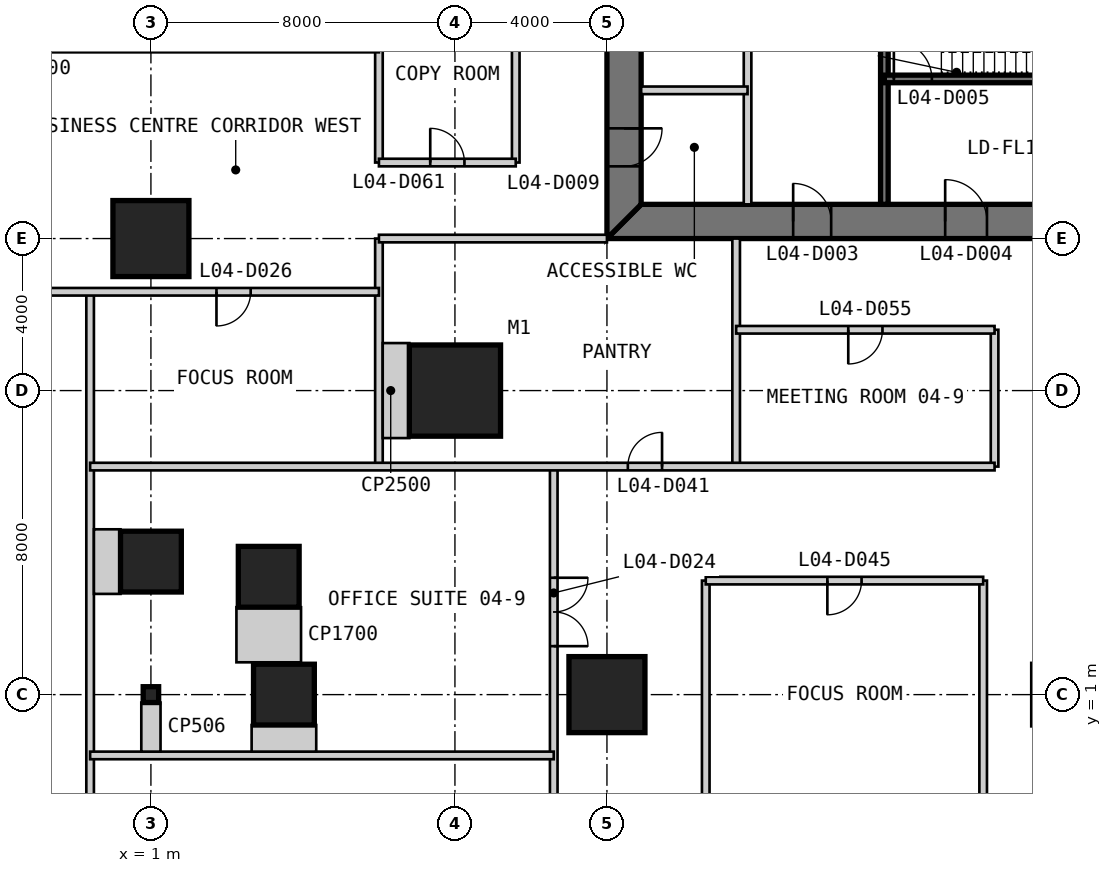
"""IFC4 building model, lengths in metres.
Left out: names, types, materials, properties, quantities, classifications, styles, units other than length and angle.
Written with IfcOpenShell. Run it as: python <this file> out.ifc"""

import sys

from ifc_helpers import new_model, si_unit, direction, frame, frame_2d, origin, origin_2d, place, context, subcontext, project, spatial, polyline, rectangle, i_section, outline, extrude, element, fill, save


model = new_model("IFC4")
c1 = context("Model", 3, precision=1e-05, world=origin(), true_north=direction((0.0, 1.0)))
c2 = subcontext(c1, "Body", "Model", "MODEL_VIEW")
j1 = project(units=[si_unit("LENGTHUNIT", "METRE"), si_unit("PLANEANGLEUNIT", "RADIAN")], contexts=[c1])
p1 = place(None, origin())
s1 = spatial("IfcSite", under=j1, at=p1, CompositionType="ELEMENT")
p2 = place(p1, origin())
s2 = spatial("IfcBuilding", under=s1, at=p2, CompositionType="ELEMENT")
p3 = place(p2, frame((0.0, 0.0, 21.4)))
s3 = spatial("IfcBuildingStorey", under=s2, at=p3, CompositionType="ELEMENT", Elevation=21.4)
p4 = place(p3, frame((9.0, 9.0, 0.0), z_axis=(0.0, 0.0, 1.0), x_axis=(1.0, 0.0, 0.0)))
e1 = element("IfcColumn", 1, at=p4, inside=s3, PredefinedType="COLUMN", context=c2, shape_type="SweptSolid", body=[
    extrude(rectangle(XDim=2.4, YDim=2.4, at=origin_2d()), origin(), (0.0, 0.0, 1.0), 4.8),
])
p5 = place(p3, frame((4.5, 1.0, 0.0), z_axis=(0.0, 0.0, 1.0), x_axis=(1.0, 0.0, 0.0)))
e2 = element("IfcColumn", 2, at=p5, inside=s3, PredefinedType="COLUMN", context=c2, shape_type="SweptSolid", body=[
    extrude(rectangle(XDim=1.6, YDim=1.6, at=origin_2d()), origin(), (0.0, 0.0, 1.0), 4.8),
])
for number, where, z_axis, x_axis in (
    (3, (13.0, 1.0, 0.0), (0.0, 0.0, 1.0), (1.0, 0.0, 0.0)),
    (4, (1.0, 13.0, 0.0), (0.0, 0.0, 1.0), (1.0, 0.0, 0.0)),
):
    element("IfcColumn", number, at=place(p3, frame(where, z_axis=z_axis, x_axis=x_axis)), inside=s3, PredefinedType="COLUMN", context=c2, shape_type="SweptSolid", body=[
        extrude(rectangle(XDim=2.0, YDim=2.0, at=origin_2d()), origin(), (0.0, 0.0, 1.0), 4.8),
    ])
for number, where, z_axis, x_axis in (
    (5, (1.0, 4.5, 0.0), (0.0, 0.0, 1.0), (1.0, 0.0, 0.0)),
    (6, (4.1, 4.1, 0.0), (0.0, 0.0, 1.0), (1.0, 0.0, 0.0)),
):
    element("IfcColumn", number, at=place(p3, frame(where, z_axis=z_axis, x_axis=x_axis)), inside=s3, PredefinedType="COLUMN", context=c2, shape_type="SweptSolid", body=[
        extrude(rectangle(XDim=1.6, YDim=1.6, at=origin_2d()), origin(), (0.0, 0.0, 1.0), 4.8),
    ])
p6 = place(p3, frame((1.0, 1.0, 0.0), z_axis=(0.0, 0.0, 1.0), x_axis=(1.0, 0.0, 0.0)))
e7 = element("IfcColumn", 7, at=p6, inside=s3, PredefinedType="COLUMN", context=c2, shape_type="SweptSolid", body=[
    extrude(i_section(OverallWidth=0.406, OverallDepth=0.417, WebThickness=0.03, FlangeThickness=0.048, at=origin_2d()), origin(), (0.0, 0.0, 1.0), 4.8),
])
p7 = place(p3, frame((13.0, 13.45, 0.0), z_axis=(0.0, 0.0, 1.0), x_axis=(1.0, 0.0, 0.0)))
e8 = element("IfcWall", 8, at=p7, inside=s3, PredefinedType="SHEAR", context=c2, shape_type="SweptSolid", body=[
    extrude(outline(polyline([(0.0, -0.45), (24.0, -0.45), (23.1, 0.45), (0.9, 0.45), (0.0, -0.45)])), origin(), (0.0, 0.0, 1.0), 4.8),
])
p8 = place(p7, frame((4.9, 0.0, 0.0)))
e9 = element("IfcOpeningElement", 9, at=p8, cuts=e8, PredefinedType="OPENING", context=c2, shape_type="SweptSolid", body=[
    extrude(rectangle(XDim=1.0, YDim=2.2, at=frame_2d((0.5, 1.1))), frame((0.0, 0.46, 0.0), z_axis=(0.0, -1.0, 0.0), x_axis=(1.0, 0.0, 0.0)), (0.0, 0.0, 1.0), 0.92),
])
p9 = place(p7, frame((8.9, 0.0, 0.0)))
e10 = element("IfcOpeningElement", 10, at=p9, cuts=e8, PredefinedType="OPENING", context=c2, shape_type="SweptSolid", body=[
    extrude(rectangle(XDim=1.1, YDim=2.2, at=frame_2d((0.55, 1.1))), frame((0.0, 0.46, 0.0), z_axis=(0.0, -1.0, 0.0), x_axis=(1.0, 0.0, 0.0)), (0.0, 0.0, 1.0), 0.92),
])
p10 = place(p7, frame((15.05, 0.0, 0.0)))
e11 = element("IfcOpeningElement", 11, at=p10, cuts=e8, PredefinedType="OPENING", context=c2, shape_type="SweptSolid", body=[
    extrude(rectangle(XDim=0.9, YDim=2.2, at=frame_2d((0.45, 1.1))), frame((0.0, 0.46, 0.0), z_axis=(0.0, -1.0, 0.0), x_axis=(1.0, 0.0, 0.0)), (0.0, 0.0, 1.0), 0.92),
])
p11 = place(p7, frame((17.9, 0.0, 0.0)))
e12 = element("IfcOpeningElement", 12, at=p11, cuts=e8, PredefinedType="OPENING", context=c2, shape_type="SweptSolid", body=[
    extrude(rectangle(XDim=1.0, YDim=2.2, at=frame_2d((0.5, 1.1))), frame((0.0, 0.46, 0.0), z_axis=(0.0, -1.0, 0.0), x_axis=(1.0, 0.0, 0.0)), (0.0, 0.0, 1.0), 0.92),
])
p12 = place(p7, frame((21.4, 0.0, 0.0)))
e13 = element("IfcOpeningElement", 13, at=p12, cuts=e8, PredefinedType="OPENING", context=c2, shape_type="SweptSolid", body=[
    extrude(rectangle(XDim=1.0, YDim=2.2, at=frame_2d((0.5, 1.1))), frame((0.0, 0.46, 0.0), z_axis=(0.0, -1.0, 0.0), x_axis=(1.0, 0.0, 0.0)), (0.0, 0.0, 1.0), 0.92),
])
p13 = place(p3, frame((13.45, 36.1, 0.0), z_axis=(0.0, 0.0, 1.0), x_axis=(0.0, -1.0, 0.0)))
e14 = element("IfcWall", 14, at=p13, inside=s3, PredefinedType="SHEAR", context=c2, shape_type="SweptSolid", body=[
    extrude(outline(polyline([(-0.9, -0.45), (23.1, -0.45), (22.2, 0.45), (0.0, 0.45), (-0.9, -0.45)])), origin(), (0.0, 0.0, 1.0), 4.8),
])
p14 = place(p13, frame((20.2, 0.0, 0.0)))
e15 = element("IfcOpeningElement", 15, at=p14, cuts=e14, PredefinedType="OPENING", context=c2, shape_type="SweptSolid", body=[
    extrude(rectangle(XDim=1.0, YDim=2.2, at=frame_2d((0.5, 1.1))), frame((0.0, 0.46, 0.0), z_axis=(0.0, -1.0, 0.0), x_axis=(1.0, 0.0, 0.0)), (0.0, 0.0, 1.0), 0.92),
])
p15 = place(p13, frame((17.25, 0.0, 0.0)))
e16 = element("IfcOpeningElement", 16, at=p15, cuts=e14, PredefinedType="OPENING", context=c2, shape_type="SweptSolid", body=[
    extrude(rectangle(XDim=0.9, YDim=2.2, at=frame_2d((0.45, 1.1))), frame((0.0, 0.46, 0.0), z_axis=(0.0, -1.0, 0.0), x_axis=(1.0, 0.0, 0.0)), (0.0, 0.0, 1.0), 0.92),
])
p16 = place(p3, frame((16.7, 13.9, 0.0), z_axis=(0.0, 0.0, 1.0), x_axis=(0.0, 1.0, 0.0)))
e17 = element("IfcWall", 17, at=p16, inside=s3, PredefinedType="PARTITIONING", context=c2, shape_type="SweptSolid", body=[
    extrude(rectangle(XDim=16.1, YDim=0.2, at=frame_2d((8.05, 0.0))), origin(), (0.0, 0.0, 1.0), 4.6),
])
p17 = place(p3, frame((20.3, 13.9, 0.0), z_axis=(0.0, 0.0, 1.0), x_axis=(0.0, 1.0, 0.0)))
e18 = element("IfcWall", 18, at=p17, inside=s3, PredefinedType="SOLIDWALL", context=c2, shape_type="SweptSolid", body=[
    extrude(rectangle(XDim=16.1, YDim=0.2, at=frame_2d((8.05, 0.0))), origin(), (0.0, 0.0, 1.0), 4.6),
])
p18 = place(p3, frame((20.3, 17.2, 0.0), z_axis=(0.0, 0.0, 1.0), x_axis=(1.0, 0.0, 0.0)))
e19 = element("IfcWall", 19, at=p18, inside=s3, PredefinedType="SOLIDWALL", context=c2, shape_type="SweptSolid", body=[
    extrude(rectangle(XDim=9.4, YDim=0.2, at=frame_2d((4.7, 0.0))), origin(), (0.0, 0.0, 1.0), 4.6),
])
p19 = place(p18, frame((0.25, 0.0, 0.0)))
e20 = element("IfcOpeningElement", 20, at=p19, cuts=e19, PredefinedType="OPENING", context=c2, shape_type="SweptSolid", body=[
    extrude(rectangle(XDim=1.0, YDim=2.2, at=frame_2d((0.5, 1.1))), frame((0.0, 0.11, 0.0), z_axis=(0.0, -1.0, 0.0), x_axis=(1.0, 0.0, 0.0)), (0.0, 0.0, 1.0), 0.22),
])
p20 = place(p3, frame((13.9, 16.9, 0.0), z_axis=(0.0, 0.0, 1.0), x_axis=(1.0, 0.0, 0.0)))
e21 = element("IfcWall", 21, at=p20, inside=s3, PredefinedType="PARTITIONING", context=c2, shape_type="SweptSolid", body=[
    extrude(rectangle(XDim=2.8, YDim=0.2, at=frame_2d((1.4, 0.0))), origin(), (0.0, 0.0, 1.0), 4.6),
])
p21 = place(p3, frame((-0.6, -7.25, 0.0), z_axis=(0.0, 0.0, 1.0), x_axis=(0.0, 1.0, 0.0)))
e22 = element("IfcWall", 22, at=p21, inside=s3, PredefinedType="PARTITIONING", context=c2, shape_type="SweptSolid", body=[
    extrude(rectangle(XDim=18.85, YDim=0.2, at=frame_2d((9.425, 0.0))), origin(), (0.0, 0.0, 1.0), 4.5),
])
p22 = place(p3, frame((7.0, 7.0, 0.0), z_axis=(0.0, 0.0, 1.0), x_axis=(0.0, 1.0, 0.0)))
e23 = element("IfcWall", 23, at=p22, inside=s3, PredefinedType="PARTITIONING", context=c2, shape_type="SweptSolid", body=[
    extrude(rectangle(XDim=6.0, YDim=0.2, at=frame_2d((3.0, 0.0))), origin(), (0.0, 0.0, 1.0), 4.5),
])
p23 = place(p3, frame((7.0, 15.0, 0.0), z_axis=(0.0, 0.0, 1.0), x_axis=(0.0, 1.0, 0.0)))
e24 = element("IfcWall", 24, at=p23, inside=s3, PredefinedType="PARTITIONING", context=c2, shape_type="SweptSolid", body=[
    extrude(rectangle(XDim=28.0, YDim=0.2, at=frame_2d((14.0, 0.0))), origin(), (0.0, 0.0, 1.0), 3.843),
])
p24 = place(p3, frame((10.6, 15.0, 0.0), z_axis=(0.0, 0.0, 1.0), x_axis=(0.0, 1.0, 0.0)))
e25 = element("IfcWall", 25, at=p24, inside=s3, PredefinedType="PARTITIONING", context=c2, shape_type="SweptSolid", body=[
    extrude(rectangle(XDim=4.6, YDim=0.2, at=frame_2d((2.3, 0.0))), origin(), (0.0, 0.0, 1.0), 4.5),
])
p25 = place(p3, frame((11.6, -7.25, 0.0), z_axis=(0.0, 0.0, 1.0), x_axis=(0.0, 1.0, 0.0)))
e26 = element("IfcWall", 26, at=p25, inside=s3, PredefinedType="PARTITIONING", context=c2, shape_type="SweptSolid", body=[
    extrude(rectangle(XDim=14.25, YDim=0.2, at=frame_2d((7.125, 0.0))), origin(), (0.0, 0.0, 1.0), 4.5),
])
p26 = place(p25, frame((2.45, 0.0, 0.0)))
e27 = element("IfcOpeningElement", 27, at=p26, cuts=e26, PredefinedType="OPENING", context=c2, shape_type="SweptSolid", body=[
    extrude(rectangle(XDim=1.8, YDim=2.4, at=frame_2d((0.9, 1.2))), frame((0.0, 0.11, 0.0), z_axis=(0.0, -1.0, 0.0), x_axis=(1.0, 0.0, 0.0)), (0.0, 0.0, 1.0), 0.22),
])
p27 = place(p25, frame((9.525, 0.0, 0.0)))
e28 = element("IfcOpeningElement", 28, at=p27, cuts=e26, PredefinedType="OPENING", context=c2, shape_type="SweptSolid", body=[
    extrude(rectangle(XDim=1.8, YDim=2.4, at=frame_2d((0.9, 1.2))), frame((0.0, 0.11, 0.0), z_axis=(0.0, -1.0, 0.0), x_axis=(1.0, 0.0, 0.0)), (0.0, 0.0, 1.0), 0.22),
])
for number, where, z_axis, x_axis in (
    (29, (15.6, -2.0, 0.0), (0.0, 0.0, 1.0), (0.0, 1.0, 0.0)),
    (30, (16.4, 7.0, 0.0), (0.0, 0.0, 1.0), (0.0, 1.0, 0.0)),
    (31, (22.9, -2.0, 0.0), (0.0, 0.0, 1.0), (0.0, 1.0, 0.0)),
):
    element("IfcWall", number, at=place(p3, frame(where, z_axis=z_axis, x_axis=x_axis)), inside=s3, PredefinedType="PARTITIONING", context=c2, shape_type="SweptSolid", body=[
        extrude(rectangle(XDim=6.0, YDim=0.2, at=frame_2d((3.0, 0.0))), origin(), (0.0, 0.0, 1.0), 4.5),
    ])
p28 = place(p3, frame((23.2, 7.0, 0.0), z_axis=(0.0, 0.0, 1.0), x_axis=(0.0, 1.0, 0.0)))
e32 = element("IfcWall", 32, at=p28, inside=s3, PredefinedType="PARTITIONING", context=c2, shape_type="SweptSolid", body=[
    extrude(rectangle(XDim=3.6, YDim=0.2, at=frame_2d((1.8, 0.0))), origin(), (0.0, 0.0, 1.0), 4.5),
])
p29 = place(p3, frame((-0.6, -0.6, 0.0), z_axis=(0.0, 0.0, 1.0), x_axis=(1.0, 0.0, 0.0)))
e33 = element("IfcWall", 33, at=p29, inside=s3, PredefinedType="PARTITIONING", context=c2, shape_type="SweptSolid", body=[
    extrude(rectangle(XDim=12.2, YDim=0.2, at=frame_2d((6.1, 0.0))), origin(), (0.0, 0.0, 1.0), 4.5),
])
p30 = place(p3, frame((15.6, 4.0, 0.0), z_axis=(0.0, 0.0, 1.0), x_axis=(1.0, 0.0, 0.0)))
e34 = element("IfcWall", 34, at=p30, inside=s3, PredefinedType="PARTITIONING", context=c2, shape_type="SweptSolid", body=[
    extrude(rectangle(XDim=7.3, YDim=0.2, at=frame_2d((3.65, 0.0))), origin(), (0.0, 0.0, 1.0), 4.5),
])
p31 = place(p30, frame((3.2, 0.0, 0.0)))
e35 = element("IfcOpeningElement", 35, at=p31, cuts=e34, PredefinedType="OPENING", context=c2, shape_type="SweptSolid", body=[
    extrude(rectangle(XDim=0.9, YDim=2.2, at=frame_2d((0.45, 1.1))), frame((0.0, 0.11, 0.0), z_axis=(0.0, -1.0, 0.0), x_axis=(1.0, 0.0, 0.0)), (0.0, 0.0, 1.0), 0.22),
])
p32 = place(p3, frame((-0.6, 7.0, 0.0), z_axis=(0.0, 0.0, 1.0), x_axis=(1.0, 0.0, 0.0)))
e36 = element("IfcWall", 36, at=p32, inside=s3, PredefinedType="PARTITIONING", context=c2, shape_type="SweptSolid", body=[
    extrude(rectangle(XDim=23.8, YDim=0.2, at=frame_2d((11.9, 0.0))), origin(), (0.0, 0.0, 1.0), 4.5),
])
p33 = place(p32, frame((14.15, 0.0, 0.0)))
e37 = element("IfcOpeningElement", 37, at=p33, cuts=e36, PredefinedType="OPENING", context=c2, shape_type="SweptSolid", body=[
    extrude(rectangle(XDim=0.9, YDim=2.2, at=frame_2d((0.45, 1.1))), frame((0.0, 0.11, 0.0), z_axis=(0.0, -1.0, 0.0), x_axis=(1.0, 0.0, 0.0)), (0.0, 0.0, 1.0), 0.22),
])
p34 = place(p3, frame((16.4, 10.6, 0.0), z_axis=(0.0, 0.0, 1.0), x_axis=(1.0, 0.0, 0.0)))
e38 = element("IfcWall", 38, at=p34, inside=s3, PredefinedType="PARTITIONING", context=c2, shape_type="SweptSolid", body=[
    extrude(rectangle(XDim=6.8, YDim=0.2, at=frame_2d((3.4, 0.0))), origin(), (0.0, 0.0, 1.0), 4.5),
])
p35 = place(p34, frame((2.95, 0.0, 0.0)))
e39 = element("IfcOpeningElement", 39, at=p35, cuts=e38, PredefinedType="OPENING", context=c2, shape_type="SweptSolid", body=[
    extrude(rectangle(XDim=0.9, YDim=2.2, at=frame_2d((0.45, 1.1))), frame((0.0, 0.11, 0.0), z_axis=(0.0, -1.0, 0.0), x_axis=(1.0, 0.0, 0.0)), (0.0, 0.0, 1.0), 0.22),
])
p36 = place(p3, frame((-7.25, 11.6, 0.0), z_axis=(0.0, 0.0, 1.0), x_axis=(1.0, 0.0, 0.0)))
e40 = element("IfcWall", 40, at=p36, inside=s3, PredefinedType="PARTITIONING", context=c2, shape_type="SweptSolid", body=[
    extrude(rectangle(XDim=14.25, YDim=0.2, at=frame_2d((7.125, 0.0))), origin(), (0.0, 0.0, 1.0), 4.5),
])
p37 = place(p36, frame((2.45, 0.0, 0.0)))
e41 = element("IfcOpeningElement", 41, at=p37, cuts=e40, PredefinedType="OPENING", context=c2, shape_type="SweptSolid", body=[
    extrude(rectangle(XDim=1.8, YDim=2.4, at=frame_2d((0.9, 1.2))), frame((0.0, 0.11, 0.0), z_axis=(0.0, -1.0, 0.0), x_axis=(1.0, 0.0, 0.0)), (0.0, 0.0, 1.0), 0.22),
])
p38 = place(p36, frame((9.975, 0.0, 0.0)))
e42 = element("IfcOpeningElement", 42, at=p38, cuts=e40, PredefinedType="OPENING", context=c2, shape_type="SweptSolid", body=[
    extrude(rectangle(XDim=0.9, YDim=2.2, at=frame_2d((0.45, 1.1))), frame((0.0, 0.11, 0.0), z_axis=(0.0, -1.0, 0.0), x_axis=(1.0, 0.0, 0.0)), (0.0, 0.0, 1.0), 0.22),
])
p39 = place(p3, frame((7.0, 13.0, 0.0), z_axis=(0.0, 0.0, 1.0), x_axis=(1.0, 0.0, 0.0)))
e43 = element("IfcWall", 43, at=p39, inside=s3, PredefinedType="PARTITIONING", context=c2, shape_type="SweptSolid", body=[
    extrude(rectangle(XDim=6.0, YDim=0.2, at=frame_2d((3.0, 0.0))), origin(), (0.0, 0.0, 1.0), 3.653),
])
p40 = place(p3, frame((7.0, 15.0, 0.0), z_axis=(0.0, 0.0, 1.0), x_axis=(1.0, 0.0, 0.0)))
e44 = element("IfcWall", 44, at=p40, inside=s3, PredefinedType="PARTITIONING", context=c2, shape_type="SweptSolid", body=[
    extrude(rectangle(XDim=3.6, YDim=0.2, at=frame_2d((1.8, 0.0))), origin(), (0.0, 0.0, 1.0), 4.5),
])
p41 = place(p40, frame((1.35, 0.0, 0.0)))
e45 = element("IfcOpeningElement", 45, at=p41, cuts=e44, PredefinedType="OPENING", context=c2, shape_type="SweptSolid", body=[
    extrude(rectangle(XDim=0.9, YDim=2.2, at=frame_2d((0.45, 1.1))), frame((0.0, 0.11, 0.0), z_axis=(0.0, -1.0, 0.0), x_axis=(1.0, 0.0, 0.0)), (0.0, 0.0, 1.0), 0.22),
])
for number, where, z_axis, x_axis in (
    (46, (4.5, -0.5, 0.0), (0.0, 0.0, 1.0), (0.0, 1.0, 0.0)),
    (47, (-0.5, 4.5, 0.0), (0.0, 0.0, 1.0), (1.0, 0.0, 0.0)),
):
    element("IfcWall", number, at=place(p3, frame(where, z_axis=z_axis, x_axis=x_axis)), inside=s3, PredefinedType="PARTITIONING", context=c2, shape_type="SweptSolid", body=[
        extrude(rectangle(XDim=0.7, YDim=1.7, at=frame_2d((0.35, 0.0))), origin(), (0.0, 0.0, 1.0), 4.5),
    ])
p42 = place(p3, frame((4.1, 1.85, 0.0), z_axis=(0.0, 0.0, 1.0), x_axis=(0.0, 1.0, 0.0)))
e48 = element("IfcWall", 48, at=p42, inside=s3, PredefinedType="PARTITIONING", context=c2, shape_type="SweptSolid", body=[
    extrude(rectangle(XDim=1.45, YDim=1.7, at=frame_2d((0.725, 0.0))), origin(), (0.0, 0.0, 1.0), 4.5),
])
p43 = place(p3, frame((1.0, -0.5, 0.0), z_axis=(0.0, 0.0, 1.0), x_axis=(0.0, 1.0, 0.0)))
e49 = element("IfcWall", 49, at=p43, inside=s3, PredefinedType="PARTITIONING", context=c2, shape_type="SweptSolid", body=[
    extrude(rectangle(XDim=1.292, YDim=0.506, at=frame_2d((0.646, 0.0))), origin(), (0.0, 0.0, 1.0), 3.754),
])
p44 = place(p3, frame((7.1, 9.0, 0.0), z_axis=(0.0, 0.0, 1.0), x_axis=(1.0, 0.0, 0.0)))
e50 = element("IfcWall", 50, at=p44, inside=s3, PredefinedType="PARTITIONING", context=c2, shape_type="SweptSolid", body=[
    extrude(rectangle(XDim=0.7, YDim=2.5, at=frame_2d((0.35, 0.0))), origin(), (0.0, 0.0, 1.0), 4.5),
])
p45 = place(p8, origin())
e51 = element("IfcDoor", 51, at=p45, inside=s3, OperationType="SINGLE_SWING_LEFT", PredefinedType="DOOR", context=c2, shape_type="SweptSolid", body=[
    extrude(rectangle(XDim=1.0, YDim=2.2, at=frame_2d((0.5, 1.1))), frame((0.0, 0.025, 0.0), z_axis=(0.0, -1.0, 0.0), x_axis=(1.0, 0.0, 0.0)), (0.0, 0.0, 1.0), 0.05),
    extrude(outline(polyline([(0.0, 0.0), (0.04, 0.0), (0.04, 2.16), (0.96, 2.16), (0.96, 0.0), (1.0, 0.0), (1.0, 2.2), (0.0, 2.2), (0.0, 0.0)])), frame((0.0, 0.3, 0.0), z_axis=(0.0, -1.0, 0.0), x_axis=(1.0, 0.0, 0.0)), (0.0, 0.0, 1.0), 0.6),
])
fill(e9, e51)
p46 = place(p9, origin())
e52 = element("IfcDoor", 52, at=p46, inside=s3, OperationType="SINGLE_SWING_LEFT", PredefinedType="DOOR", context=c2, shape_type="SweptSolid", body=[
    extrude(rectangle(XDim=1.1, YDim=2.2, at=frame_2d((0.55, 1.1))), frame((0.0, 0.025, 0.0), z_axis=(0.0, -1.0, 0.0), x_axis=(1.0, 0.0, 0.0)), (0.0, 0.0, 1.0), 0.05),
    extrude(outline(polyline([(0.0, 0.0), (0.04, 0.0), (0.04, 2.16), (1.06, 2.16), (1.06, 0.0), (1.1, 0.0), (1.1, 2.2), (0.0, 2.2), (0.0, 0.0)])), frame((0.0, 0.3, 0.0), z_axis=(0.0, -1.0, 0.0), x_axis=(1.0, 0.0, 0.0)), (0.0, 0.0, 1.0), 0.6),
])
fill(e10, e52)
p47 = place(p19, origin())
e53 = element("IfcDoor", 53, at=p47, inside=s3, OperationType="SINGLE_SWING_LEFT", PredefinedType="DOOR", context=c2, shape_type="SweptSolid", body=[
    extrude(rectangle(XDim=1.0, YDim=2.2, at=frame_2d((0.5, 1.1))), frame((0.0, 0.025, 0.0), z_axis=(0.0, -1.0, 0.0), x_axis=(1.0, 0.0, 0.0)), (0.0, 0.0, 1.0), 0.05),
])
fill(e20, e53)
p48 = place(p14, origin())
e54 = element("IfcDoor", 54, at=p48, inside=s3, OperationType="SINGLE_SWING_LEFT", PredefinedType="DOOR", context=c2, shape_type="SweptSolid", body=[
    extrude(rectangle(XDim=1.0, YDim=2.2, at=frame_2d((0.5, 1.1))), frame((0.0, 0.025, 0.0), z_axis=(0.0, -1.0, 0.0), x_axis=(1.0, 0.0, 0.0)), (0.0, 0.0, 1.0), 0.05),
    extrude(outline(polyline([(0.0, 0.0), (0.04, 0.0), (0.04, 2.16), (0.96, 2.16), (0.96, 0.0), (1.0, 0.0), (1.0, 2.2), (0.0, 2.2), (0.0, 0.0)])), frame((0.0, 0.3, 0.0), z_axis=(0.0, -1.0, 0.0), x_axis=(1.0, 0.0, 0.0)), (0.0, 0.0, 1.0), 0.6),
])
fill(e15, e54)
p49 = place(p27, frame((1.8, 0.0, 0.0), z_axis=(0.0, 0.0, 1.0), x_axis=(-1.0, 0.0, 0.0)))
e55 = element("IfcDoor", 55, at=p49, inside=s3, OperationType="DOUBLE_DOOR_SINGLE_SWING", PredefinedType="DOOR", context=c2, shape_type="SweptSolid", body=[
    extrude(rectangle(XDim=1.8, YDim=2.4, at=frame_2d((0.9, 1.2))), frame((0.0, 0.025, 0.0), z_axis=(0.0, -1.0, 0.0), x_axis=(1.0, 0.0, 0.0)), (0.0, 0.0, 1.0), 0.05),
])
fill(e28, e55)
p50 = place(p38, frame((0.9, 0.0, 0.0), z_axis=(0.0, 0.0, 1.0), x_axis=(-1.0, 0.0, 0.0)))
e56 = element("IfcDoor", 56, at=p50, inside=s3, OperationType="SINGLE_SWING_RIGHT", PredefinedType="DOOR", context=c2, shape_type="SweptSolid", body=[
    extrude(rectangle(XDim=0.9, YDim=2.2, at=frame_2d((0.45, 1.1))), frame((0.0, 0.025, 0.0), z_axis=(0.0, -1.0, 0.0), x_axis=(1.0, 0.0, 0.0)), (0.0, 0.0, 1.0), 0.05),
])
fill(e42, e56)
p51 = place(p33, origin())
e57 = element("IfcDoor", 57, at=p51, inside=s3, OperationType="SINGLE_SWING_RIGHT", PredefinedType="DOOR", context=c2, shape_type="SweptSolid", body=[
    extrude(rectangle(XDim=0.9, YDim=2.2, at=frame_2d((0.45, 1.1))), frame((0.0, 0.025, 0.0), z_axis=(0.0, -1.0, 0.0), x_axis=(1.0, 0.0, 0.0)), (0.0, 0.0, 1.0), 0.05),
])
fill(e37, e57)
p52 = place(p31, frame((0.9, 0.0, 0.0), z_axis=(0.0, 0.0, 1.0), x_axis=(-1.0, 0.0, 0.0)))
e58 = element("IfcDoor", 58, at=p52, inside=s3, OperationType="SINGLE_SWING_RIGHT", PredefinedType="DOOR", context=c2, shape_type="SweptSolid", body=[
    extrude(rectangle(XDim=0.9, YDim=2.2, at=frame_2d((0.45, 1.1))), frame((0.0, 0.025, 0.0), z_axis=(0.0, -1.0, 0.0), x_axis=(1.0, 0.0, 0.0)), (0.0, 0.0, 1.0), 0.05),
])
fill(e35, e58)
p53 = place(p35, frame((0.9, 0.0, 0.0), z_axis=(0.0, 0.0, 1.0), x_axis=(-1.0, 0.0, 0.0)))
e59 = element("IfcDoor", 59, at=p53, inside=s3, OperationType="SINGLE_SWING_RIGHT", PredefinedType="DOOR", context=c2, shape_type="SweptSolid", body=[
    extrude(rectangle(XDim=0.9, YDim=2.2, at=frame_2d((0.45, 1.1))), frame((0.0, 0.025, 0.0), z_axis=(0.0, -1.0, 0.0), x_axis=(1.0, 0.0, 0.0)), (0.0, 0.0, 1.0), 0.05),
])
fill(e39, e59)
p54 = place(p41, origin())
e60 = element("IfcDoor", 60, at=p54, inside=s3, OperationType="SINGLE_SWING_LEFT", PredefinedType="DOOR", context=c2, shape_type="SweptSolid", body=[
    extrude(rectangle(XDim=0.9, YDim=2.2, at=frame_2d((0.45, 1.1))), frame((0.0, 0.025, 0.0), z_axis=(0.0, -1.0, 0.0), x_axis=(1.0, 0.0, 0.0)), (0.0, 0.0, 1.0), 0.05),
])
fill(e45, e60)
save(model, sys.argv[1])
